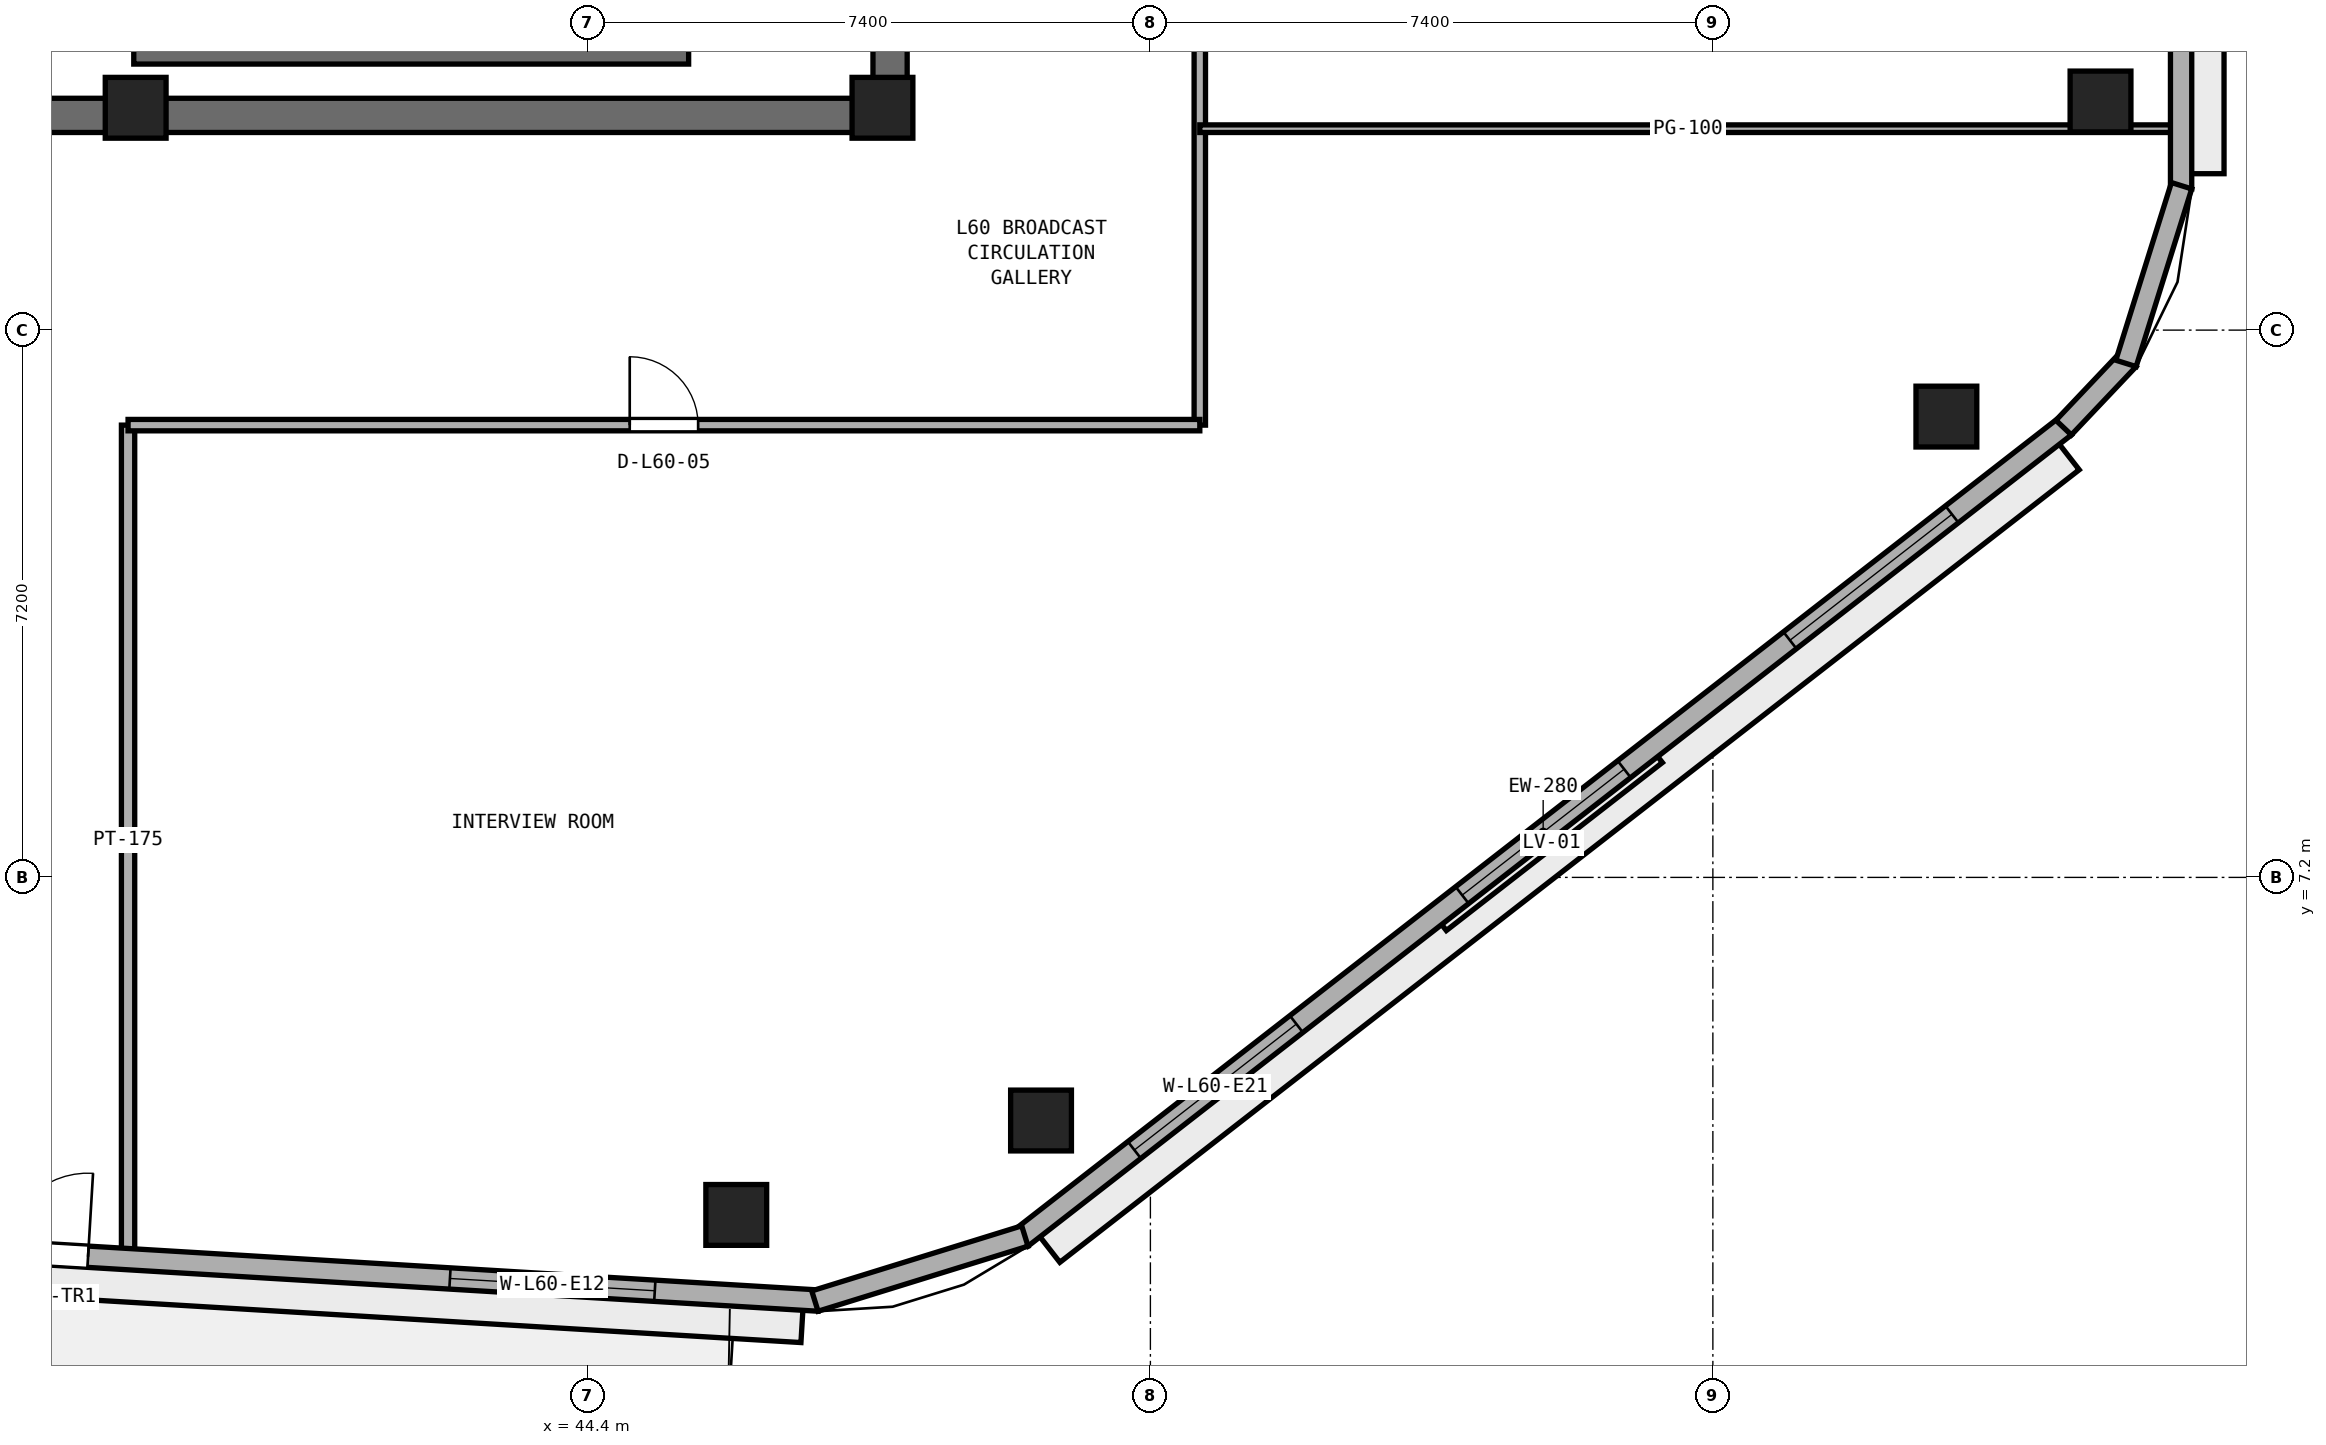
"""IFC4 building model, lengths in metres.
Left out: names, types, materials, properties, quantities, classifications, styles, units other than length and angle.
Written with IfcOpenShell. Run it as: python <this file> out.ifc"""

import sys

from ifc_helpers import new_model, si_unit, direction, frame, frame_2d, origin, origin_2d, place, context, subcontext, project, spatial, rectangle, extrude, element, fill, save


model = new_model("IFC4")
c1 = context("Model", 3, precision=1e-05, world=origin(), true_north=direction((0.0, 1.0)))
c2 = subcontext(c1, "Body", "Model", "MODEL_VIEW")
j1 = project(units=[si_unit("LENGTHUNIT", "METRE"), si_unit("PLANEANGLEUNIT", "RADIAN")], contexts=[c1])
p1 = place(None, origin())
s1 = spatial("IfcSite", under=j1, at=p1, CompositionType="ELEMENT")
p2 = place(p1, origin())
s2 = spatial("IfcBuilding", under=s1, at=p2, CompositionType="ELEMENT")
p3 = place(p2, frame((0.0, 0.0, 236.4)))
s3 = spatial("IfcBuildingStorey", under=s2, at=p3, CompositionType="ELEMENT", Elevation=236.4)
p4 = place(p3, frame((25.4, 17.225, 0.0), z_axis=(0.0, 0.0, 1.0), x_axis=(1.0, 0.0, 0.0)))
e1 = element("IfcWall", 1, at=p4, inside=s3, PredefinedType="SHEAR", context=c2, shape_type="SweptSolid", body=[
    extrude(rectangle(XDim=23.2, YDim=0.45, at=frame_2d((11.6, 0.0))), origin(), (0.0, 0.0, 1.0), 3.51),
])
p5 = place(p3, frame((48.375, 17.45, 0.0), z_axis=(0.0, 0.0, 1.0), x_axis=(0.0, 1.0, 0.0)))
e2 = element("IfcWall", 2, at=p5, inside=s3, PredefinedType="SHEAR", context=c2, shape_type="SweptSolid", body=[
    extrude(rectangle(XDim=15.5, YDim=0.45, at=frame_2d((7.75, 0.0))), origin(), (0.0, 0.0, 1.0), 3.51),
])
p6 = place(p5, frame((5.85, 0.0, 0.0)))
e3 = element("IfcOpeningElement", 3, at=p6, cuts=e2, PredefinedType="OPENING", context=c2, shape_type="SweptSolid", body=[
    extrude(rectangle(XDim=1.5, YDim=2.15, at=frame_2d((0.75, 1.075))), frame((0.0, 0.235, 0.0), z_axis=(0.0, -1.0, 0.0), x_axis=(1.0, 0.0, 0.0)), (0.0, 0.0, 1.0), 0.47),
])
for number, where, z_axis, x_axis in (
    (4, (38.45, 17.325, 0.0), (0.0, 0.0, 1.0), (1.0, 0.0, 0.0)),
    (5, (48.275, 17.325, 0.0), (0.0, 0.0, 1.0), (1.0, 0.0, 0.0)),
):
    element("IfcColumn", number, at=place(p3, frame(where, z_axis=z_axis, x_axis=x_axis)), inside=s3, PredefinedType="PILASTER", context=c2, shape_type="SweptSolid", body=[
        extrude(rectangle(XDim=0.8, YDim=0.8, at=origin_2d()), origin(), (0.0, 0.0, 1.0), 3.8),
    ])
for number, where, z_axis, x_axis in (
    (6, (46.352, 2.76, 0.0), (0.0, 0.0, 1.0), (1.0, 0.0, 0.0)),
    (7, (50.361, 4.002, 0.0), (0.0, 0.0, 1.0), (1.0, 0.0, 0.0)),
    (8, (62.272, 13.262, 0.0), (0.0, 0.0, 1.0), (1.0, 0.0, 0.0)),
    (9, (64.3, 17.408, 0.0), (0.0, 0.0, 1.0), (1.0, 0.0, 0.0)),
):
    element("IfcColumn", number, at=place(p3, frame(where, z_axis=z_axis, x_axis=x_axis)), inside=s3, PredefinedType="COLUMN", context=c2, shape_type="SweptSolid", body=[
        extrude(rectangle(XDim=0.8, YDim=0.8, at=origin_2d()), origin(), (0.0, 0.0, 1.0), 3.8),
    ])
p7 = place(p3, frame((38.425, 18.025, 0.0), z_axis=(0.0, 0.0, 1.0), x_axis=(1.0, 0.0, 0.0)))
e10 = element("IfcWall", 10, at=p7, inside=s3, PredefinedType="SHEAR", context=c2, shape_type="SweptSolid", body=[
    extrude(rectangle(XDim=7.3, YDim=0.25, at=frame_2d((3.65, 0.0))), origin(), (0.0, 0.0, 1.0), 3.51),
])
p8 = place(p3, frame((52.45, 13.15, 0.0), z_axis=(0.0, 0.0, 1.0), x_axis=(0.0, 1.0, 0.0)))
e11 = element("IfcWall", 11, at=p8, inside=s3, PredefinedType="PARTITIONING", context=c2, shape_type="SweptSolid", body=[
    extrude(rectangle(XDim=14.65, YDim=0.15, at=frame_2d((7.325, 0.0))), origin(), (0.0, 0.0, 1.0), 3.51),
])
p9 = place(p8, frame((8.575, 0.0, 0.0)))
e12 = element("IfcOpeningElement", 12, at=p9, cuts=e11, PredefinedType="OPENING", context=c2, shape_type="SweptSolid", body=[
    extrude(rectangle(XDim=0.9, YDim=2.1, at=frame_2d((0.45, 1.05))), frame((0.0, 0.085, 0.0), z_axis=(0.0, -1.0, 0.0), x_axis=(1.0, 0.0, 0.0)), (0.0, 0.0, 1.0), 0.17),
])
p10 = place(p3, frame((38.35, 2.243, 0.0), z_axis=(0.0, 0.0, 1.0), x_axis=(0.0, 1.0, 0.0)))
e13 = element("IfcWall", 13, at=p10, inside=s3, PredefinedType="PARTITIONING", context=c2, shape_type="SweptSolid", body=[
    extrude(rectangle(XDim=10.907, YDim=0.175, at=frame_2d((5.454, 0.0))), origin(), (0.0, 0.0, 1.0), 3.51),
])
p11 = place(p3, frame((38.35, 13.15, 0.0), z_axis=(0.0, 0.0, 1.0), x_axis=(1.0, 0.0, 0.0)))
e14 = element("IfcWall", 14, at=p11, inside=s3, PredefinedType="PARTITIONING", context=c2, shape_type="SweptSolid", body=[
    extrude(rectangle(XDim=14.1, YDim=0.15, at=frame_2d((7.05, 0.0))), origin(), (0.0, 0.0, 1.0), 3.51),
])
p12 = place(p11, frame((6.6, 0.0, 0.0)))
e15 = element("IfcOpeningElement", 15, at=p12, cuts=e14, PredefinedType="OPENING", context=c2, shape_type="SweptSolid", body=[
    extrude(rectangle(XDim=0.9, YDim=2.1, at=frame_2d((0.45, 1.05))), frame((0.0, 0.085, 0.0), z_axis=(0.0, -1.0, 0.0), x_axis=(1.0, 0.0, 0.0)), (0.0, 0.0, 1.0), 0.17),
])
p13 = place(p3, frame((52.45, 17.05, 0.0), z_axis=(0.0, 0.0, 1.0), x_axis=(1.0, 0.0, 0.0)))
e16 = element("IfcWall", 16, at=p13, inside=s3, PredefinedType="PARTITIONING", context=c2, shape_type="SweptSolid", body=[
    extrude(rectangle(XDim=12.845, YDim=0.1, at=frame_2d((6.422, 0.0))), origin(), (0.0, 0.0, 1.0), 3.51),
])
p14 = place(p3, frame((28.411, 2.774, 0.0), z_axis=(0.0, 0.0, 1.0), x_axis=(0.998203068368, -0.059921901676, 0.0)))
e17 = element("IfcWall", 17, at=p14, inside=s3, PredefinedType="STANDARD", context=c2, shape_type="SweptSolid", body=[
    extrude(rectangle(XDim=19.06, YDim=0.28, at=frame_2d((9.53, 0.0))), origin(), (0.0, 0.0, 1.0), 3.51),
])
p15 = place(p14, frame((8.33, 0.0, 0.0)))
e18 = element("IfcOpeningElement", 18, at=p15, cuts=e17, PredefinedType="OPENING", context=c2, shape_type="SweptSolid", body=[
    extrude(rectangle(XDim=1.1, YDim=2.2, at=frame_2d((0.55, 1.1))), frame((0.0, 0.15, 0.0), z_axis=(0.0, -1.0, 0.0), x_axis=(1.0, 0.0, 0.0)), (0.0, 0.0, 1.0), 0.3),
])
p16 = place(p14, frame((2.16, 0.0, 0.9)))
e19 = element("IfcOpeningElement", 19, at=p16, cuts=e17, PredefinedType="OPENING", context=c2, shape_type="SweptSolid", body=[
    extrude(rectangle(XDim=2.7, YDim=1.75, at=frame_2d((1.35, 0.875))), frame((0.0, 0.15, 0.0), z_axis=(0.0, -1.0, 0.0), x_axis=(1.0, 0.0, 0.0)), (0.0, 0.0, 1.0), 0.3),
])
p17 = place(p14, frame((14.2, 0.0, 0.9)))
e20 = element("IfcOpeningElement", 20, at=p17, cuts=e17, PredefinedType="OPENING", context=c2, shape_type="SweptSolid", body=[
    extrude(rectangle(XDim=2.7, YDim=1.75, at=frame_2d((1.35, 0.875))), frame((0.0, 0.15, 0.0), z_axis=(0.0, -1.0, 0.0), x_axis=(1.0, 0.0, 0.0)), (0.0, 0.0, 1.0), 0.3),
])
p18 = place(p3, frame((50.104, 2.459, 0.0), z_axis=(0.0, 0.0, 1.0), x_axis=(0.789464857485, 0.613795763097, 0.0)))
e21 = element("IfcWall", 21, at=p18, inside=s3, PredefinedType="STANDARD", context=c2, shape_type="SweptSolid", body=[
    extrude(rectangle(XDim=17.387, YDim=0.28, at=frame_2d((8.694, 0.0))), origin(), (0.0, 0.0, 1.0), 3.51),
])
p19 = place(p18, frame((1.881, 0.0, 0.9)))
e22 = element("IfcOpeningElement", 22, at=p19, cuts=e21, PredefinedType="OPENING", context=c2, shape_type="SweptSolid", body=[
    extrude(rectangle(XDim=2.7, YDim=1.75, at=frame_2d((1.35, 0.875))), frame((0.0, 0.15, 0.0), z_axis=(0.0, -1.0, 0.0), x_axis=(1.0, 0.0, 0.0)), (0.0, 0.0, 1.0), 0.3),
])
p20 = place(p18, frame((7.344, 0.0, 0.9)))
e23 = element("IfcOpeningElement", 23, at=p20, cuts=e21, PredefinedType="OPENING", context=c2, shape_type="SweptSolid", body=[
    extrude(rectangle(XDim=2.7, YDim=1.75, at=frame_2d((1.35, 0.875))), frame((0.0, 0.15, 0.0), z_axis=(0.0, -1.0, 0.0), x_axis=(1.0, 0.0, 0.0)), (0.0, 0.0, 1.0), 0.3),
])
p21 = place(p18, frame((12.806, 0.0, 0.9)))
e24 = element("IfcOpeningElement", 24, at=p21, cuts=e21, PredefinedType="OPENING", context=c2, shape_type="SweptSolid", body=[
    extrude(rectangle(XDim=2.7, YDim=1.75, at=frame_2d((1.35, 0.875))), frame((0.0, 0.15, 0.0), z_axis=(0.0, -1.0, 0.0), x_axis=(1.0, 0.0, 0.0)), (0.0, 0.0, 1.0), 0.3),
])
p22 = place(p3, frame((65.36, 16.258, 0.0), z_axis=(0.0, 0.0, 1.0), x_axis=(0.0, 1.0, 0.0)))
e25 = element("IfcWall", 25, at=p22, inside=s3, PredefinedType="STANDARD", context=c2, shape_type="SweptSolid", body=[
    extrude(rectangle(XDim=19.168, YDim=0.28, at=frame_2d((9.584, 0.0))), origin(), (0.0, 0.0, 1.0), 3.51),
])
p23 = place(p22, frame((2.178, 0.0, 0.9)))
e26 = element("IfcOpeningElement", 26, at=p23, cuts=e25, PredefinedType="OPENING", context=c2, shape_type="SweptSolid", body=[
    extrude(rectangle(XDim=2.7, YDim=1.75, at=frame_2d((1.35, 0.875))), frame((0.0, 0.15, 0.0), z_axis=(0.0, -1.0, 0.0), x_axis=(1.0, 0.0, 0.0)), (0.0, 0.0, 1.0), 0.3),
])
p24 = place(p22, frame((7.984, 0.0, 0.9)))
e27 = element("IfcOpeningElement", 27, at=p24, cuts=e25, PredefinedType="OPENING", context=c2, shape_type="SweptSolid", body=[
    extrude(rectangle(XDim=2.7, YDim=1.75, at=frame_2d((1.35, 0.875))), frame((0.0, 0.15, 0.0), z_axis=(0.0, -1.0, 0.0), x_axis=(1.0, 0.0, 0.0)), (0.0, 0.0, 1.0), 0.3),
])
p25 = place(p22, frame((14.04, 0.0, 0.9)))
e28 = element("IfcOpeningElement", 28, at=p25, cuts=e25, PredefinedType="OPENING", context=c2, shape_type="SweptSolid", body=[
    extrude(rectangle(XDim=2.7, YDim=1.75, at=frame_2d((1.35, 0.875))), frame((0.0, 0.15, 0.0), z_axis=(0.0, -1.0, 0.0), x_axis=(1.0, 0.0, 0.0)), (0.0, 0.0, 1.0), 0.3),
])
p26 = place(p3, frame((47.386, 1.626, 0.0), z_axis=(0.0, 0.0, 1.0), x_axis=(0.955189316149, 0.29599555793, 0.0)))
e29 = element("IfcWall", 29, at=p26, inside=s3, PredefinedType="STANDARD", context=c2, shape_type="SweptSolid", body=[
    extrude(rectangle(XDim=2.892, YDim=0.28, at=frame_2d((1.446, 0.0))), origin(), (0.0, 0.0, 1.0), 3.51),
])
p27 = place(p3, frame((63.815, 13.117, 0.0), z_axis=(0.0, 0.0, 1.0), x_axis=(0.687733716128, 0.725963040176, 0.0)))
e30 = element("IfcWall", 30, at=p27, inside=s3, PredefinedType="STANDARD", context=c2, shape_type="SweptSolid", body=[
    extrude(rectangle(XDim=1.239, YDim=0.28, at=frame_2d((0.62, 0.0))), origin(), (0.0, 0.0, 1.0), 3.51),
])
p28 = place(p3, frame((64.635, 13.962, 0.0), z_axis=(0.0, 0.0, 1.0), x_axis=(0.298649578722, 0.954362839348, 0.0)))
e31 = element("IfcWall", 31, at=p28, inside=s3, PredefinedType="STANDARD", context=c2, shape_type="SweptSolid", body=[
    extrude(rectangle(XDim=2.449, YDim=0.28, at=frame_2d((1.225, 0.0))), origin(), (0.0, 0.0, 1.0), 3.51),
])
p29 = place(p12, origin())
e32 = element("IfcDoor", 32, at=p29, inside=s3, OperationType="SINGLE_SWING_LEFT", PredefinedType="DOOR", context=c2, shape_type="SweptSolid", body=[
    extrude(rectangle(XDim=0.9, YDim=2.1, at=frame_2d((0.45, 1.05))), frame((0.0, 0.025, 0.0), z_axis=(0.0, -1.0, 0.0), x_axis=(1.0, 0.0, 0.0)), (0.0, 0.0, 1.0), 0.05),
])
fill(e15, e32)
p30 = place(p15, origin())
e33 = element("IfcDoor", 33, at=p30, inside=s3, OperationType="SINGLE_SWING_RIGHT", PredefinedType="DOOR", context=c2, shape_type="SweptSolid", body=[
    extrude(rectangle(XDim=1.1, YDim=2.2, at=frame_2d((0.55, 1.1))), frame((0.0, 0.025, 0.0), z_axis=(0.0, -1.0, 0.0), x_axis=(1.0, 0.0, 0.0)), (0.0, 0.0, 1.0), 0.05),
])
fill(e18, e33)
p31 = place(p17, origin())
e34 = element("IfcWindow", 34, at=p31, inside=s3, PartitioningType="SINGLE_PANEL", PredefinedType="WINDOW", context=c2, shape_type="SweptSolid", body=[
    extrude(rectangle(XDim=2.7, YDim=1.75, at=frame_2d((1.35, 0.875))), frame((0.0, 0.03, 0.0), z_axis=(0.0, -1.0, 0.0), x_axis=(1.0, 0.0, 0.0)), (0.0, 0.0, 1.0), 0.06),
])
fill(e20, e34)
p32 = place(p19, origin())
e35 = element("IfcWindow", 35, at=p32, inside=s3, PartitioningType="SINGLE_PANEL", PredefinedType="WINDOW", context=c2, shape_type="SweptSolid", body=[
    extrude(rectangle(XDim=2.7, YDim=1.75, at=frame_2d((1.35, 0.875))), frame((0.0, 0.03, 0.0), z_axis=(0.0, -1.0, 0.0), x_axis=(1.0, 0.0, 0.0)), (0.0, 0.0, 1.0), 0.06),
])
fill(e22, e35)
p33 = place(p20, origin())
e36 = element("IfcWindow", 36, at=p33, inside=s3, PartitioningType="SINGLE_PANEL", PredefinedType="WINDOW", context=c2, shape_type="SweptSolid", body=[
    extrude(rectangle(XDim=2.7, YDim=1.75, at=frame_2d((1.35, 0.875))), frame((0.0, 0.03, 0.0), z_axis=(0.0, -1.0, 0.0), x_axis=(1.0, 0.0, 0.0)), (0.0, 0.0, 1.0), 0.06),
])
fill(e23, e36)
p34 = place(p21, origin())
e37 = element("IfcWindow", 37, at=p34, inside=s3, PartitioningType="SINGLE_PANEL", PredefinedType="WINDOW", context=c2, shape_type="SweptSolid", body=[
    extrude(rectangle(XDim=2.7, YDim=1.75, at=frame_2d((1.35, 0.875))), frame((0.0, 0.03, 0.0), z_axis=(0.0, -1.0, 0.0), x_axis=(1.0, 0.0, 0.0)), (0.0, 0.0, 1.0), 0.06),
])
fill(e24, e37)
save(model, sys.argv[1])
